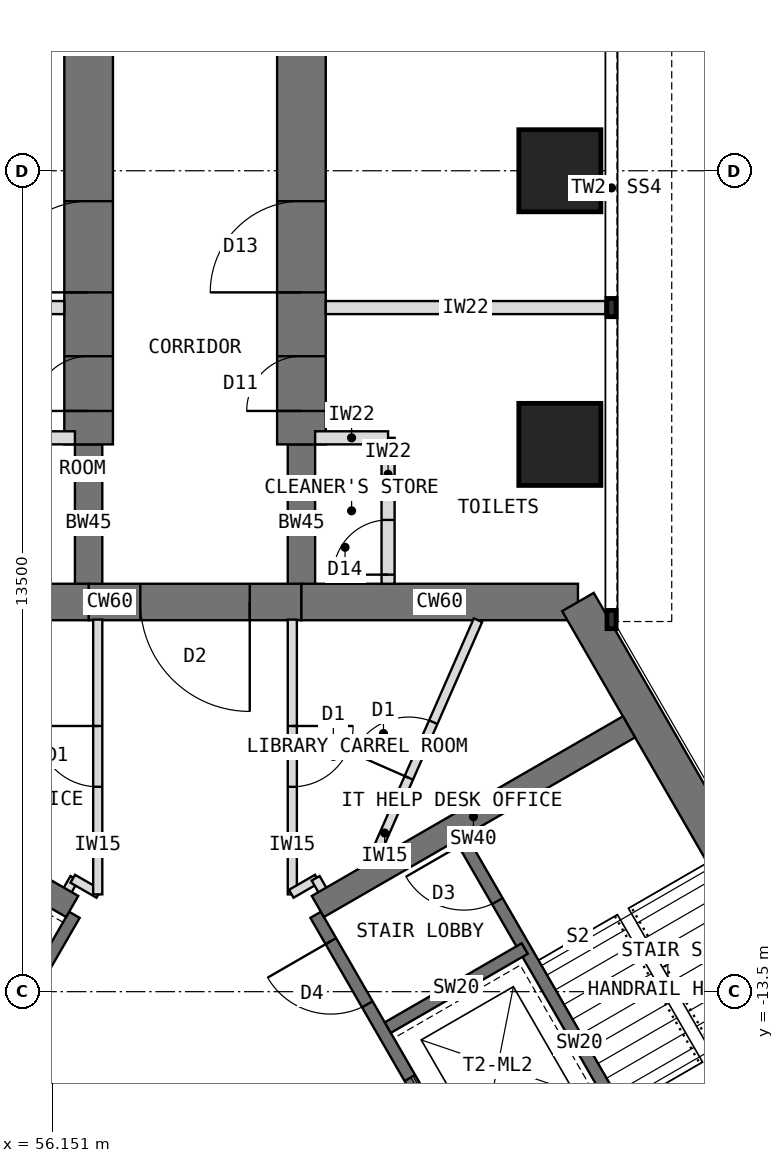
"""IFC4 building model, lengths in metres.
Left out: names, types, materials, properties, quantities, classifications, styles, units other than length and angle.
Written with IfcOpenShell. Run it as: python <this file> out.ifc"""

import sys

from ifc_helpers import new_model, si_unit, direction, frame, frame_2d, origin, origin_2d, place, context, subcontext, project, spatial, rectangle, extrude, element, fill, save


model = new_model("IFC4")
c1 = context("Model", 3, precision=1e-05, world=origin(), true_north=direction((0.0, 1.0)))
c2 = subcontext(c1, "Body", "Model", "MODEL_VIEW")
j1 = project(units=[si_unit("LENGTHUNIT", "METRE"), si_unit("PLANEANGLEUNIT", "RADIAN")], contexts=[c1])
p1 = place(None, origin())
s1 = spatial("IfcSite", under=j1, at=p1, CompositionType="ELEMENT")
p2 = place(p1, origin())
s2 = spatial("IfcBuilding", under=s1, at=p2, CompositionType="ELEMENT")
p3 = place(p2, frame((0.0, 0.0, 101.5)))
s3 = spatial("IfcBuildingStorey", under=s2, at=p3, CompositionType="ELEMENT", Elevation=101.5)
p4 = place(p3, frame((64.798, -7.092, 0.0), z_axis=(0.0, 0.0, 1.0), x_axis=(-1.0, 0.0, 0.0)))
e1 = element("IfcWall", 1, at=p4, inside=s3, PredefinedType="SHEAR", context=c2, shape_type="SweptSolid", body=[
    extrude(rectangle(XDim=4.548, YDim=0.6, at=frame_2d((2.274, 0.0))), origin(), (0.0, 0.0, 1.0), 4.0),
])
p5 = place(p3, frame((60.25, -7.092, 0.0), z_axis=(0.0, 0.0, 1.0), x_axis=(-1.0, 0.0, 0.0)))
e2 = element("IfcWall", 2, at=p5, inside=s3, PredefinedType="SHEAR", context=c2, shape_type="SweptSolid", body=[
    extrude(rectangle(XDim=3.5, YDim=0.6, at=frame_2d((1.75, 0.0))), origin(), (0.0, 0.0, 1.0), 4.0),
])
p6 = place(p5, frame((0.85, 0.0, 0.0)))
e3 = element("IfcOpeningElement", 3, at=p6, cuts=e2, PredefinedType="OPENING", context=c2, shape_type="SweptSolid", body=[
    extrude(rectangle(XDim=1.8, YDim=2.1, at=frame_2d((0.9, 1.05))), frame((0.0, 0.31, 0.0), z_axis=(0.0, -1.0, 0.0), x_axis=(1.0, 0.0, 0.0)), (0.0, 0.0, 1.0), 0.62),
])
p7 = place(p3, frame((56.75, -7.092, 0.0), z_axis=(0.0, 0.0, 1.0), x_axis=(-1.0, 0.0, 0.0)))
e4 = element("IfcWall", 4, at=p7, inside=s3, PredefinedType="SHEAR", context=c2, shape_type="SweptSolid", body=[
    extrude(rectangle(XDim=4.548, YDim=0.6, at=frame_2d((2.274, 0.0))), origin(), (0.0, 0.0, 1.0), 4.0),
])
p8 = place(p3, frame((71.096, -18.0, 0.0), z_axis=(0.0, 0.0, 1.0), x_axis=(-0.500005998175, 0.866021940709, 0.0)))
e5 = element("IfcWall", 5, at=p8, inside=s3, PredefinedType="SHEAR", context=c2, shape_type="SweptSolid", body=[
    extrude(rectangle(XDim=12.596, YDim=0.6, at=frame_2d((6.298, 0.0))), origin(), (0.0, 0.0, 1.0), 4.0),
])
p9 = place(p3, frame((56.75, -7.092, 0.0), z_axis=(0.0, 0.0, 1.0), x_axis=(0.0, 1.0, 0.0)))
e6 = element("IfcWall", 6, at=p9, inside=s3, PredefinedType="SHEAR", context=c2, shape_type="SweptSolid", body=[
    extrude(rectangle(XDim=2.592, YDim=0.45, at=frame_2d((1.296, 0.0))), origin(), (0.0, 0.0, 1.0), 4.0),
])
p10 = place(p3, frame((56.75, -4.5, 0.0), z_axis=(0.0, 0.0, 1.0), x_axis=(0.0, 1.0, 0.0)))
e7 = element("IfcWall", 7, at=p10, inside=s3, PredefinedType="SHEAR", context=c2, shape_type="SweptSolid", body=[
    extrude(rectangle(XDim=13.2, YDim=0.8, at=frame_2d((6.6, 0.0))), origin(), (0.0, 0.0, 1.0), 4.0),
])
p11 = place(p10, frame((0.55, 0.0, 0.0)))
e8 = element("IfcOpeningElement", 8, at=p11, cuts=e7, PredefinedType="OPENING", context=c2, shape_type="SweptSolid", body=[
    extrude(rectangle(XDim=0.9, YDim=2.1, at=frame_2d((0.45, 1.05))), frame((0.0, 0.41, 0.0), z_axis=(0.0, -1.0, 0.0), x_axis=(1.0, 0.0, 0.0)), (0.0, 0.0, 1.0), 0.82),
])
p12 = place(p10, frame((2.5, 0.0, 0.0)))
e9 = element("IfcOpeningElement", 9, at=p12, cuts=e7, PredefinedType="OPENING", context=c2, shape_type="SweptSolid", body=[
    extrude(rectangle(XDim=1.5, YDim=2.1, at=frame_2d((0.75, 1.05))), frame((0.0, 0.41, 0.0), z_axis=(0.0, -1.0, 0.0), x_axis=(1.0, 0.0, 0.0)), (0.0, 0.0, 1.0), 0.82),
])
p13 = place(p3, frame((60.25, -7.092, 0.0), z_axis=(0.0, 0.0, 1.0), x_axis=(0.0, 1.0, 0.0)))
e10 = element("IfcWall", 10, at=p13, inside=s3, PredefinedType="SHEAR", context=c2, shape_type="SweptSolid", body=[
    extrude(rectangle(XDim=2.592, YDim=0.45, at=frame_2d((1.296, 0.0))), origin(), (0.0, 0.0, 1.0), 4.0),
])
p14 = place(p3, frame((60.25, -4.5, 0.0), z_axis=(0.0, 0.0, 1.0), x_axis=(0.0, 1.0, 0.0)))
e11 = element("IfcWall", 11, at=p14, inside=s3, PredefinedType="SHEAR", context=c2, shape_type="SweptSolid", body=[
    extrude(rectangle(XDim=13.2, YDim=0.8, at=frame_2d((6.6, 0.0))), origin(), (0.0, 0.0, 1.0), 4.0),
])
p15 = place(p14, frame((0.55, 0.0, 0.0)))
e12 = element("IfcOpeningElement", 12, at=p15, cuts=e11, PredefinedType="OPENING", context=c2, shape_type="SweptSolid", body=[
    extrude(rectangle(XDim=0.9, YDim=2.1, at=frame_2d((0.45, 1.05))), frame((0.0, 0.41, 0.0), z_axis=(0.0, -1.0, 0.0), x_axis=(1.0, 0.0, 0.0)), (0.0, 0.0, 1.0), 0.82),
])
p16 = place(p14, frame((2.5, 0.0, 0.0)))
e13 = element("IfcOpeningElement", 13, at=p16, cuts=e11, PredefinedType="OPENING", context=c2, shape_type="SweptSolid", body=[
    extrude(rectangle(XDim=1.5, YDim=2.1, at=frame_2d((0.75, 1.05))), frame((0.0, 0.41, 0.0), z_axis=(0.0, -1.0, 0.0), x_axis=(1.0, 0.0, 0.0)), (0.0, 0.0, 1.0), 0.82),
])
for number, where, z_axis, x_axis in (
    (14, (64.5, -4.5, 0.0), (0.0, 0.0, 1.0), (1.0, 0.0, 0.0)),
    (15, (64.5, 0.0, 0.0), (0.0, 0.0, 1.0), (1.0, 0.0, 0.0)),
):
    element("IfcColumn", number, at=place(p3, frame(where, z_axis=z_axis, x_axis=x_axis)), inside=s3, PredefinedType="COLUMN", context=c2, shape_type="SweptSolid", body=[
        extrude(rectangle(XDim=1.35, YDim=1.35, at=origin_2d()), origin(), (0.0, 0.0, 1.0), 4.0),
    ])
p17 = place(p3, frame((56.516, -12.236, 0.0), z_axis=(0.0, 0.0, 1.0), x_axis=(-0.49999894854, -0.866026010844, 0.0)))
e16 = element("IfcWall", 16, at=p17, inside=s3, PredefinedType="SHEAR", context=c2, shape_type="SweptSolid", body=[
    extrude(rectangle(XDim=8.0, YDim=0.2, at=frame_2d((4.0, 0.0))), origin(), (0.0, 0.0, 1.0), 4.0),
])
p18 = place(p17, frame((6.3, 0.0, 0.0)))
e17 = element("IfcOpeningElement", 17, at=p18, cuts=e16, PredefinedType="OPENING", context=c2, shape_type="SweptSolid", body=[
    extrude(rectangle(XDim=1.2, YDim=2.1, at=frame_2d((0.6, 1.05))), frame((0.0, 0.11, 0.0), z_axis=(0.0, -1.0, 0.0), x_axis=(1.0, 0.0, 0.0)), (0.0, 0.0, 1.0), 0.22),
])
p19 = place(p3, frame((56.48, -12.099, 0.0), z_axis=(0.0, 0.0, 1.0), x_axis=(-0.866009424208, 0.500027676417, 0.0)))
e18 = element("IfcWall", 18, at=p19, inside=s3, PredefinedType="SHEAR", context=c2, shape_type="SweptSolid", body=[
    extrude(rectangle(XDim=5.908, YDim=0.4, at=frame_2d((2.954, 0.0))), origin(), (0.0, 0.0, 1.0), 4.0),
])
p20 = place(p3, frame((64.484, -19.164, 0.0), z_axis=(0.0, 0.0, 1.0), x_axis=(-0.49999894854, 0.866026010844, 0.0)))
e19 = element("IfcWall", 19, at=p20, inside=s3, PredefinedType="SHEAR", context=c2, shape_type="SweptSolid", body=[
    extrude(rectangle(XDim=8.0, YDim=0.2, at=frame_2d((4.0, 0.0))), origin(), (0.0, 0.0, 1.0), 4.0),
])
p21 = place(p20, frame((6.3, 0.0, 0.0)))
e20 = element("IfcOpeningElement", 20, at=p21, cuts=e19, PredefinedType="OPENING", context=c2, shape_type="SweptSolid", body=[
    extrude(rectangle(XDim=1.2, YDim=2.1, at=frame_2d((0.6, 1.05))), frame((0.0, 0.11, 0.0), z_axis=(0.0, -1.0, 0.0), x_axis=(1.0, 0.0, 0.0)), (0.0, 0.0, 1.0), 0.22),
])
p22 = place(p20, frame((0.9, 0.0, 0.0)))
e21 = element("IfcOpeningElement", 21, at=p22, cuts=e19, PredefinedType="OPENING", context=c2, shape_type="SweptSolid", body=[
    extrude(rectangle(XDim=1.1, YDim=2.2, at=frame_2d((0.55, 1.1))), frame((0.0, 0.11, 0.0), z_axis=(0.0, -1.0, 0.0), x_axis=(1.0, 0.0, 0.0)), (0.0, 0.0, 1.0), 0.22),
])
p23 = place(p20, frame((3.8, 0.0, 0.0)))
e22 = element("IfcOpeningElement", 22, at=p23, cuts=e19, PredefinedType="OPENING", context=c2, shape_type="SweptSolid", body=[
    extrude(rectangle(XDim=1.1, YDim=2.2, at=frame_2d((0.55, 1.1))), frame((0.0, 0.11, 0.0), z_axis=(0.0, -1.0, 0.0), x_axis=(1.0, 0.0, 0.0)), (0.0, 0.0, 1.0), 0.22),
])
p24 = place(p3, frame((61.67, -14.091, 0.0), z_axis=(0.0, 0.0, 1.0), x_axis=(0.86603858612, 0.49997716683, 0.0)))
e23 = element("IfcWall", 23, at=p24, inside=s3, PredefinedType="SHEAR", context=c2, shape_type="SweptSolid", body=[
    extrude(rectangle(XDim=2.6, YDim=0.2, at=frame_2d((1.3, 0.0))), origin(), (0.0, 0.0, 1.0), 4.0),
])
p25 = place(p3, frame((66.822, -17.814, 0.0), z_axis=(0.0, 0.0, 1.0), x_axis=(-0.49999894854, 0.866026010844, 0.0)))
e24 = element("IfcWall", 24, at=p25, inside=s3, PredefinedType="SHEAR", context=c2, shape_type="SweptSolid", body=[
    extrude(rectangle(XDim=8.0, YDim=0.2, at=frame_2d((4.0, 0.0))), origin(), (0.0, 0.0, 1.0), 4.0),
])
p26 = place(p25, frame((6.7, 0.0, 0.0)))
e25 = element("IfcOpeningElement", 25, at=p26, cuts=e24, PredefinedType="OPENING", context=c2, shape_type="SweptSolid", body=[
    extrude(rectangle(XDim=1.1, YDim=2.1, at=frame_2d((0.55, 1.05))), frame((0.0, 0.11, 0.0), z_axis=(0.0, -1.0, 0.0), x_axis=(1.0, 0.0, 0.0)), (0.0, 0.0, 1.0), 0.22),
])
p27 = place(p3, frame((60.52, -12.099, 0.0), z_axis=(0.0, 0.0, 1.0), x_axis=(0.866009424208, 0.500027676417, 0.0)))
e26 = element("IfcWall", 26, at=p27, inside=s3, PredefinedType="SHEAR", context=c2, shape_type="SweptSolid", body=[
    extrude(rectangle(XDim=5.908, YDim=0.4, at=frame_2d((2.954, 0.0))), origin(), (0.0, 0.0, 1.0), 4.0),
])
p28 = place(p3, frame((56.35, -2.25, 0.0), z_axis=(0.0, 0.0, 1.0), x_axis=(-1.0, 0.0, 0.0)))
e27 = element("IfcWall", 27, at=p28, inside=s3, PredefinedType="PARTITIONING", context=c2, shape_type="SweptSolid", body=[
    extrude(rectangle(XDim=4.6, YDim=0.215, at=frame_2d((2.3, 0.0))), origin(), (0.0, 0.0, 1.0), 3.8),
])
p29 = place(p3, frame((56.525, -4.392, 0.0), z_axis=(0.0, 0.0, 1.0), x_axis=(-1.0, 0.0, 0.0)))
e28 = element("IfcWall", 28, at=p29, inside=s3, PredefinedType="PARTITIONING", context=c2, shape_type="SweptSolid", body=[
    extrude(rectangle(XDim=3.2, YDim=0.215, at=frame_2d((1.6, 0.0))), origin(), (0.0, 0.0, 1.0), 3.8),
])
p30 = place(p3, frame((60.65, -2.25, 0.0), z_axis=(0.0, 0.0, 1.0), x_axis=(1.0, 0.0, 0.0)))
e29 = element("IfcWall", 29, at=p30, inside=s3, PredefinedType="PARTITIONING", context=c2, shape_type="SweptSolid", body=[
    extrude(rectangle(XDim=4.6, YDim=0.215, at=frame_2d((2.3, 0.0))), origin(), (0.0, 0.0, 1.0), 3.8),
])
p31 = place(p3, frame((61.675, -6.792, 0.0), z_axis=(0.0, 0.0, 1.0), x_axis=(0.0, 1.0, 0.0)))
e30 = element("IfcWall", 30, at=p31, inside=s3, PredefinedType="PARTITIONING", context=c2, shape_type="SweptSolid", body=[
    extrude(rectangle(XDim=2.4, YDim=0.215, at=frame_2d((1.2, 0.0))), origin(), (0.0, 0.0, 1.0), 3.8),
])
p32 = place(p31, frame((0.15, 0.0, 0.0)))
e31 = element("IfcOpeningElement", 31, at=p32, cuts=e30, PredefinedType="OPENING", context=c2, shape_type="SweptSolid", body=[
    extrude(rectangle(XDim=0.9, YDim=2.1, at=frame_2d((0.45, 1.05))), frame((0.0, 0.117, 0.0), z_axis=(0.0, -1.0, 0.0), x_axis=(1.0, 0.0, 0.0)), (0.0, 0.0, 1.0), 0.235),
])
p33 = place(p3, frame((60.475, -4.392, 0.0), z_axis=(0.0, 0.0, 1.0), x_axis=(1.0, 0.0, 0.0)))
e32 = element("IfcWall", 32, at=p33, inside=s3, PredefinedType="PARTITIONING", context=c2, shape_type="SweptSolid", body=[
    extrude(rectangle(XDim=1.2, YDim=0.215, at=frame_2d((0.6, 0.0))), origin(), (0.0, 0.0, 1.0), 3.8),
])
p34 = place(p3, frame((56.302, -12.008, 0.0), z_axis=(0.0, 0.0, 1.0), x_axis=(0.500230298122, 0.865892400268, 0.0)))
e33 = element("IfcWall", 33, at=p34, inside=s3, PredefinedType="PARTITIONING", context=c2, shape_type="SweptSolid", body=[
    extrude(rectangle(XDim=0.43, YDim=0.15, at=frame_2d((0.215, 0.0))), origin(), (0.0, 0.0, 1.0), 3.8),
])
p35 = place(p3, frame((56.489, -11.643, 0.0), z_axis=(0.0, 0.0, 1.0), x_axis=(0.865831790172, -0.50033519877, 0.0)))
e34 = element("IfcWall", 34, at=p35, inside=s3, PredefinedType="PARTITIONING", context=c2, shape_type="SweptSolid", body=[
    extrude(rectangle(XDim=0.494, YDim=0.15, at=frame_2d((0.247, 0.0))), origin(), (0.0, 0.0, 1.0), 3.8),
])
p36 = place(p3, frame((56.9, -11.9, 0.0), z_axis=(0.0, 0.0, 1.0), x_axis=(0.0, 1.0, 0.0)))
e35 = element("IfcWall", 35, at=p36, inside=s3, PredefinedType="PARTITIONING", context=c2, shape_type="SweptSolid", body=[
    extrude(rectangle(XDim=4.519, YDim=0.15, at=frame_2d((2.259, 0.0))), origin(), (0.0, 0.0, 1.0), 3.8),
])
p37 = place(p36, frame((1.769, 0.0, 0.0)))
e36 = element("IfcOpeningElement", 36, at=p37, cuts=e35, PredefinedType="OPENING", context=c2, shape_type="SweptSolid", body=[
    extrude(rectangle(XDim=1.0, YDim=2.1, at=frame_2d((0.5, 1.05))), frame((0.0, 0.085, 0.0), z_axis=(0.0, -1.0, 0.0), x_axis=(1.0, 0.0, 0.0)), (0.0, 0.0, 1.0), 0.17),
])
p38 = place(p3, frame((60.1, -7.382, 0.0), z_axis=(0.0, 0.0, 1.0), x_axis=(0.0, -1.0, 0.0)))
e37 = element("IfcWall", 37, at=p38, inside=s3, PredefinedType="PARTITIONING", context=c2, shape_type="SweptSolid", body=[
    extrude(rectangle(XDim=4.519, YDim=0.15, at=frame_2d((2.259, 0.0))), origin(), (0.0, 0.0, 1.0), 3.8),
])
p39 = place(p38, frame((1.749, 0.0, 0.0)))
e38 = element("IfcOpeningElement", 38, at=p39, cuts=e37, PredefinedType="OPENING", context=c2, shape_type="SweptSolid", body=[
    extrude(rectangle(XDim=1.0, YDim=2.1, at=frame_2d((0.5, 1.05))), frame((0.0, 0.085, 0.0), z_axis=(0.0, -1.0, 0.0), x_axis=(1.0, 0.0, 0.0)), (0.0, 0.0, 1.0), 0.17),
])
p40 = place(p3, frame((60.083, -11.89, 0.0), z_axis=(0.0, 0.0, 1.0), x_axis=(0.865831790172, 0.50033519877, 0.0)))
e39 = element("IfcWall", 39, at=p40, inside=s3, PredefinedType="PARTITIONING", context=c2, shape_type="SweptSolid", body=[
    extrude(rectangle(XDim=0.494, YDim=0.15, at=frame_2d((0.247, 0.0))), origin(), (0.0, 0.0, 1.0), 3.8),
])
p41 = place(p3, frame((60.483, -11.635, 0.0), z_axis=(0.0, 0.0, 1.0), x_axis=(0.500230298122, -0.865892400268, 0.0)))
e40 = element("IfcWall", 40, at=p41, inside=s3, PredefinedType="PARTITIONING", context=c2, shape_type="SweptSolid", body=[
    extrude(rectangle(XDim=0.43, YDim=0.15, at=frame_2d((0.215, 0.0))), origin(), (0.0, 0.0, 1.0), 3.8),
])
p42 = place(p3, frame((61.281, -11.66, 0.0), z_axis=(0.0, 0.0, 1.0), x_axis=(0.401686926791, 0.915777054116, 0.0)))
e41 = element("IfcWall", 41, at=p42, inside=s3, PredefinedType="PARTITIONING", context=c2, shape_type="SweptSolid", body=[
    extrude(rectangle(XDim=4.661, YDim=0.15, at=frame_2d((2.331, 0.0))), origin(), (0.0, 0.0, 1.0), 3.8),
])
p43 = place(p42, frame((1.831, 0.0, 0.0)))
e42 = element("IfcOpeningElement", 42, at=p43, cuts=e41, PredefinedType="OPENING", context=c2, shape_type="SweptSolid", body=[
    extrude(rectangle(XDim=1.0, YDim=2.1, at=frame_2d((0.5, 1.05))), frame((0.0, 0.085, 0.0), z_axis=(0.0, -1.0, 0.0), x_axis=(1.0, 0.0, 0.0)), (0.0, 0.0, 1.0), 0.17),
])
p44 = place(p21, origin())
e43 = element("IfcDoor", 43, at=p44, inside=s3, OperationType="SINGLE_SWING_RIGHT", PredefinedType="DOOR", context=c2, shape_type="SweptSolid", body=[
    extrude(rectangle(XDim=1.2, YDim=2.1, at=frame_2d((0.6, 1.05))), frame((0.0, 0.025, 0.0), z_axis=(0.0, -1.0, 0.0), x_axis=(1.0, 0.0, 0.0)), (0.0, 0.0, 1.0), 0.05),
])
fill(e20, e43)
p45 = place(p23, origin())
e44 = element("IfcDoor", 44, at=p45, inside=s3, OperationType="DOUBLE_DOOR_SLIDING", PredefinedType="DOOR", context=c2, shape_type="SweptSolid", body=[
    extrude(rectangle(XDim=1.1, YDim=2.2, at=frame_2d((0.55, 1.1))), frame((0.0, 0.025, 0.0), z_axis=(0.0, -1.0, 0.0), x_axis=(1.0, 0.0, 0.0)), (0.0, 0.0, 1.0), 0.05),
])
fill(e22, e44)
p46 = place(p26, origin())
e45 = element("IfcDoor", 45, at=p46, inside=s3, OperationType="SINGLE_SWING_RIGHT", PredefinedType="DOOR", context=c2, shape_type="SweptSolid", body=[
    extrude(rectangle(XDim=1.1, YDim=2.1, at=frame_2d((0.55, 1.05))), frame((0.0, 0.025, 0.0), z_axis=(0.0, -1.0, 0.0), x_axis=(1.0, 0.0, 0.0)), (0.0, 0.0, 1.0), 0.05),
])
fill(e25, e45)
p47 = place(p6, origin())
e46 = element("IfcDoor", 46, at=p47, inside=s3, OperationType="DOUBLE_DOOR_DOUBLE_SWING", PredefinedType="DOOR", context=c2, shape_type="SweptSolid", body=[
    extrude(rectangle(XDim=1.72, YDim=2.06, at=frame_2d((0.9, 1.03))), frame((0.0, 0.025, 0.0), z_axis=(0.0, -1.0, 0.0), x_axis=(1.0, 0.0, 0.0)), (0.0, 0.0, 1.0), 0.05),
    extrude(rectangle(XDim=0.04, YDim=2.1, at=frame_2d((0.02, 1.05))), frame((0.0, 0.3, 0.0), z_axis=(0.0, -1.0, 0.0), x_axis=(1.0, 0.0, 0.0)), (0.0, 0.0, 1.0), 0.6),
    extrude(rectangle(XDim=0.04, YDim=2.1, at=frame_2d((1.78, 1.05))), frame((0.0, 0.3, 0.0), z_axis=(0.0, -1.0, 0.0), x_axis=(1.0, 0.0, 0.0)), (0.0, 0.0, 1.0), 0.6),
    extrude(rectangle(XDim=1.72, YDim=0.04, at=frame_2d((0.9, 2.08))), frame((0.0, 0.3, 0.0), z_axis=(0.0, -1.0, 0.0), x_axis=(1.0, 0.0, 0.0)), (0.0, 0.0, 1.0), 0.6),
])
fill(e3, e46)
p48 = place(p32, origin())
e47 = element("IfcDoor", 47, at=p48, inside=s3, OperationType="SINGLE_SWING_LEFT", PredefinedType="DOOR", context=c2, shape_type="SweptSolid", body=[
    extrude(rectangle(XDim=0.9, YDim=2.1, at=frame_2d((0.45, 1.05))), frame((0.0, 0.025, 0.0), z_axis=(0.0, -1.0, 0.0), x_axis=(1.0, 0.0, 0.0)), (0.0, 0.0, 1.0), 0.05),
])
fill(e31, e47)
p49 = place(p39, origin())
e48 = element("IfcDoor", 48, at=p49, inside=s3, OperationType="SINGLE_SWING_LEFT", PredefinedType="DOOR", context=c2, shape_type="SweptSolid", body=[
    extrude(rectangle(XDim=1.0, YDim=2.1, at=frame_2d((0.5, 1.05))), frame((0.0, 0.025, 0.0), z_axis=(0.0, -1.0, 0.0), x_axis=(1.0, 0.0, 0.0)), (0.0, 0.0, 1.0), 0.05),
])
fill(e38, e48)
p50 = place(p43, origin())
e49 = element("IfcDoor", 49, at=p50, inside=s3, OperationType="SINGLE_SWING_LEFT", PredefinedType="DOOR", context=c2, shape_type="SweptSolid", body=[
    extrude(rectangle(XDim=1.0, YDim=2.1, at=frame_2d((0.5, 1.05))), frame((0.0, 0.025, 0.0), z_axis=(0.0, -1.0, 0.0), x_axis=(1.0, 0.0, 0.0)), (0.0, 0.0, 1.0), 0.05),
])
fill(e42, e49)
p51 = place(p37, origin())
e50 = element("IfcDoor", 50, at=p51, inside=s3, OperationType="SINGLE_SWING_RIGHT", PredefinedType="DOOR", context=c2, shape_type="SweptSolid", body=[
    extrude(rectangle(XDim=1.0, YDim=2.1, at=frame_2d((0.5, 1.05))), frame((0.0, 0.025, 0.0), z_axis=(0.0, -1.0, 0.0), x_axis=(1.0, 0.0, 0.0)), (0.0, 0.0, 1.0), 0.05),
])
fill(e36, e50)
p52 = place(p11, origin())
e51 = element("IfcDoor", 51, at=p52, inside=s3, OperationType="SINGLE_SWING_LEFT", PredefinedType="DOOR", context=c2, shape_type="SweptSolid", body=[
    extrude(rectangle(XDim=0.82, YDim=2.06, at=frame_2d((0.45, 1.03))), frame((0.0, 0.025, 0.0), z_axis=(0.0, -1.0, 0.0), x_axis=(1.0, 0.0, 0.0)), (0.0, 0.0, 1.0), 0.05),
    extrude(rectangle(XDim=0.04, YDim=2.1, at=frame_2d((0.02, 1.05))), frame((0.0, 0.4, 0.0), z_axis=(0.0, -1.0, 0.0), x_axis=(1.0, 0.0, 0.0)), (0.0, 0.0, 1.0), 0.8),
    extrude(rectangle(XDim=0.04, YDim=2.1, at=frame_2d((0.88, 1.05))), frame((0.0, 0.4, 0.0), z_axis=(0.0, -1.0, 0.0), x_axis=(1.0, 0.0, 0.0)), (0.0, 0.0, 1.0), 0.8),
    extrude(rectangle(XDim=0.82, YDim=0.04, at=frame_2d((0.45, 2.08))), frame((0.0, 0.4, 0.0), z_axis=(0.0, -1.0, 0.0), x_axis=(1.0, 0.0, 0.0)), (0.0, 0.0, 1.0), 0.8),
])
fill(e8, e51)
p53 = place(p12, origin())
e52 = element("IfcDoor", 52, at=p53, inside=s3, OperationType="DOUBLE_DOOR_SINGLE_SWING", PredefinedType="DOOR", context=c2, shape_type="SweptSolid", body=[
    extrude(rectangle(XDim=1.42, YDim=2.06, at=frame_2d((0.75, 1.03))), frame((0.0, 0.025, 0.0), z_axis=(0.0, -1.0, 0.0), x_axis=(1.0, 0.0, 0.0)), (0.0, 0.0, 1.0), 0.05),
    extrude(rectangle(XDim=0.04, YDim=2.1, at=frame_2d((0.02, 1.05))), frame((0.0, 0.4, 0.0), z_axis=(0.0, -1.0, 0.0), x_axis=(1.0, 0.0, 0.0)), (0.0, 0.0, 1.0), 0.8),
    extrude(rectangle(XDim=0.04, YDim=2.1, at=frame_2d((1.48, 1.05))), frame((0.0, 0.4, 0.0), z_axis=(0.0, -1.0, 0.0), x_axis=(1.0, 0.0, 0.0)), (0.0, 0.0, 1.0), 0.8),
    extrude(rectangle(XDim=1.42, YDim=0.04, at=frame_2d((0.75, 2.08))), frame((0.0, 0.4, 0.0), z_axis=(0.0, -1.0, 0.0), x_axis=(1.0, 0.0, 0.0)), (0.0, 0.0, 1.0), 0.8),
])
fill(e9, e52)
p54 = place(p15, origin())
e53 = element("IfcDoor", 53, at=p54, inside=s3, OperationType="SINGLE_SWING_LEFT", PredefinedType="DOOR", context=c2, shape_type="SweptSolid", body=[
    extrude(rectangle(XDim=0.82, YDim=2.06, at=frame_2d((0.45, 1.03))), frame((0.0, 0.025, 0.0), z_axis=(0.0, -1.0, 0.0), x_axis=(1.0, 0.0, 0.0)), (0.0, 0.0, 1.0), 0.05),
    extrude(rectangle(XDim=0.04, YDim=2.1, at=frame_2d((0.02, 1.05))), frame((0.0, 0.4, 0.0), z_axis=(0.0, -1.0, 0.0), x_axis=(1.0, 0.0, 0.0)), (0.0, 0.0, 1.0), 0.8),
    extrude(rectangle(XDim=0.04, YDim=2.1, at=frame_2d((0.88, 1.05))), frame((0.0, 0.4, 0.0), z_axis=(0.0, -1.0, 0.0), x_axis=(1.0, 0.0, 0.0)), (0.0, 0.0, 1.0), 0.8),
    extrude(rectangle(XDim=0.82, YDim=0.04, at=frame_2d((0.45, 2.08))), frame((0.0, 0.4, 0.0), z_axis=(0.0, -1.0, 0.0), x_axis=(1.0, 0.0, 0.0)), (0.0, 0.0, 1.0), 0.8),
])
fill(e12, e53)
p55 = place(p16, origin())
e54 = element("IfcDoor", 54, at=p55, inside=s3, OperationType="DOUBLE_DOOR_SINGLE_SWING", PredefinedType="DOOR", context=c2, shape_type="SweptSolid", body=[
    extrude(rectangle(XDim=1.42, YDim=2.06, at=frame_2d((0.75, 1.03))), frame((0.0, 0.025, 0.0), z_axis=(0.0, -1.0, 0.0), x_axis=(1.0, 0.0, 0.0)), (0.0, 0.0, 1.0), 0.05),
    extrude(rectangle(XDim=0.04, YDim=2.1, at=frame_2d((0.02, 1.05))), frame((0.0, 0.4, 0.0), z_axis=(0.0, -1.0, 0.0), x_axis=(1.0, 0.0, 0.0)), (0.0, 0.0, 1.0), 0.8),
    extrude(rectangle(XDim=0.04, YDim=2.1, at=frame_2d((1.48, 1.05))), frame((0.0, 0.4, 0.0), z_axis=(0.0, -1.0, 0.0), x_axis=(1.0, 0.0, 0.0)), (0.0, 0.0, 1.0), 0.8),
    extrude(rectangle(XDim=1.42, YDim=0.04, at=frame_2d((0.75, 2.08))), frame((0.0, 0.4, 0.0), z_axis=(0.0, -1.0, 0.0), x_axis=(1.0, 0.0, 0.0)), (0.0, 0.0, 1.0), 0.8),
])
fill(e13, e54)
save(model, sys.argv[1])
